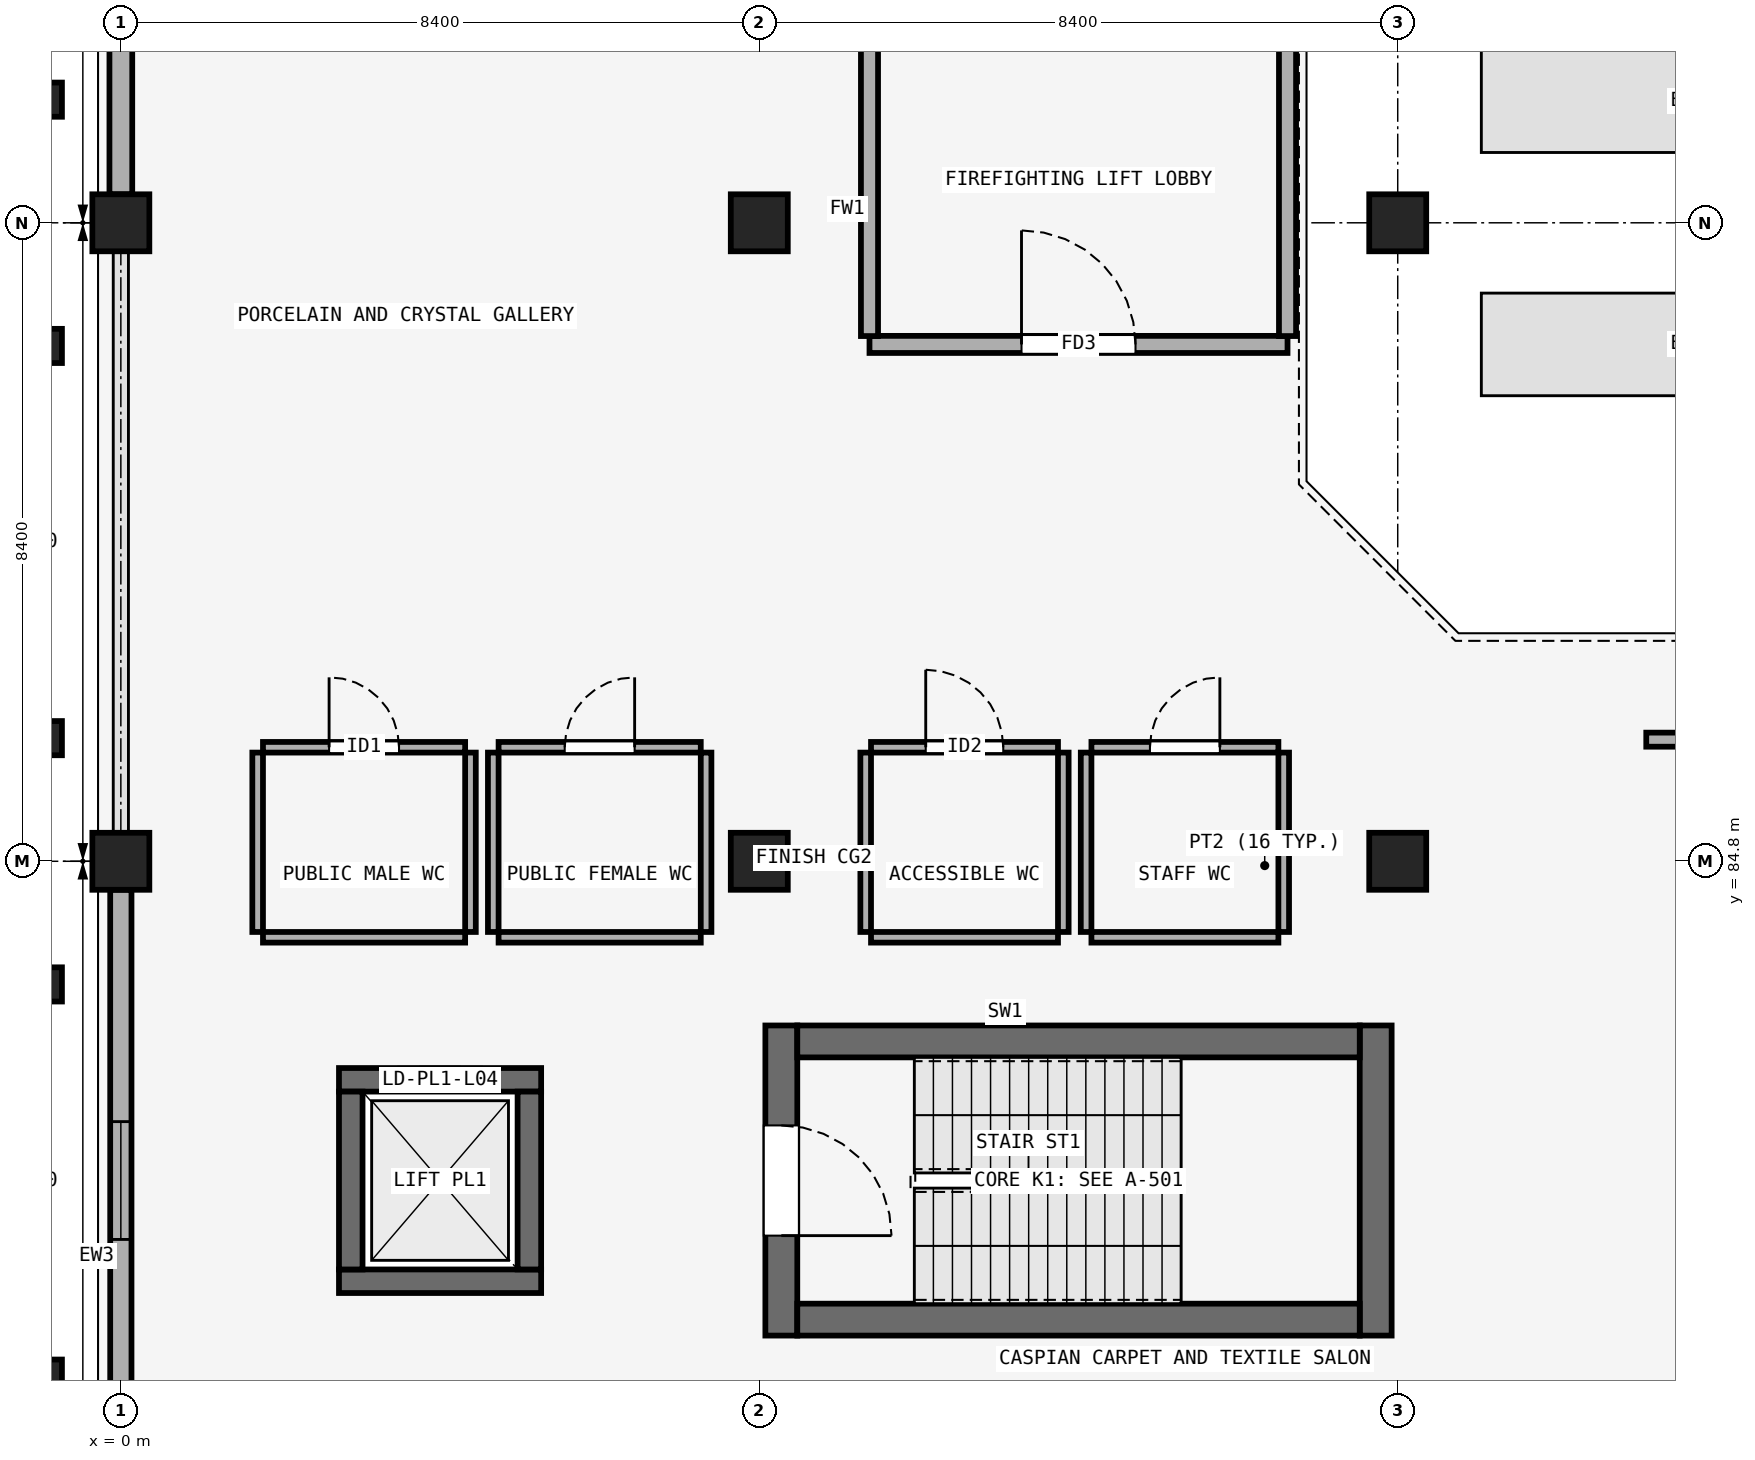
"""IFC4 building model, lengths in metres.
Left out: names, types, materials, properties, quantities, classifications, styles, units other than length and angle.
Written with IfcOpenShell. Run it as: python <this file> out.ifc"""

import sys

from ifc_helpers import new_model, si_unit, direction, frame, frame_2d, origin, origin_2d, place, context, subcontext, project, spatial, rectangle, extrude, element, fill, save


model = new_model("IFC4")
c1 = context("Model", 3, precision=1e-05, world=origin(), true_north=direction((0.0, 1.0)))
c2 = subcontext(c1, "Body", "Model", "MODEL_VIEW")
j1 = project(units=[si_unit("LENGTHUNIT", "METRE"), si_unit("PLANEANGLEUNIT", "RADIAN")], contexts=[c1])
p1 = place(None, origin())
s1 = spatial("IfcSite", under=j1, at=p1, CompositionType="ELEMENT")
p2 = place(p1, origin())
s2 = spatial("IfcBuilding", under=s1, at=p2, CompositionType="ELEMENT")
p3 = place(p2, frame((0.0, 0.0, 18.9)))
s3 = spatial("IfcBuildingStorey", under=s2, at=p3, CompositionType="ELEMENT", Elevation=18.9)
for number, where, z_axis, x_axis in (
    (1, (0.0, 84.8, 0.0), (0.0, 0.0, 1.0), (1.0, 0.0, 0.0)),
    (2, (8.4, 84.8, 0.0), (0.0, 0.0, 1.0), (1.0, 0.0, 0.0)),
    (3, (16.8, 84.8, 0.0), (0.0, 0.0, 1.0), (1.0, 0.0, 0.0)),
    (4, (0.0, 93.2, 0.0), (0.0, 0.0, 1.0), (1.0, 0.0, 0.0)),
    (5, (8.4, 93.2, 0.0), (0.0, 0.0, 1.0), (1.0, 0.0, 0.0)),
    (6, (16.8, 93.2, 0.0), (0.0, 0.0, 1.0), (1.0, 0.0, 0.0)),
):
    element("IfcColumn", number, at=place(p3, frame(where, z_axis=z_axis, x_axis=x_axis)), inside=s3, PredefinedType="COLUMN", context=c2, shape_type="SweptSolid", body=[
        extrude(rectangle(XDim=0.75, YDim=0.75, at=origin_2d()), origin(), (0.0, 0.0, 1.0), 4.5),
    ])
for number, where, z_axis, x_axis in (
    (7, (-1.05, 78.02, 0.0), (0.0, 0.0, 1.0), (0.0, 1.0, 0.0)),
    (8, (-1.05, 83.18, 0.0), (0.0, 0.0, 1.0), (0.0, 1.0, 0.0)),
    (9, (-1.05, 86.42, 0.0), (0.0, 0.0, 1.0), (0.0, 1.0, 0.0)),
    (10, (-1.05, 91.58, 0.0), (0.0, 0.0, 1.0), (0.0, 1.0, 0.0)),
    (11, (-1.05, 94.82, 0.0), (0.0, 0.0, 1.0), (0.0, 1.0, 0.0)),
):
    element("IfcColumn", number, at=place(p3, frame(where, z_axis=z_axis, x_axis=x_axis)), inside=s3, PredefinedType="PILASTER", context=c2, shape_type="SweptSolid", body=[
        extrude(rectangle(XDim=0.45, YDim=0.55, at=origin_2d()), origin(), (0.0, 0.0, 1.0), 4.5),
    ])
p4 = place(p3, frame((0.0, 76.775, 0.0), z_axis=(0.0, 0.0, 1.0), x_axis=(0.0, 1.0, 0.0)))
e12 = element("IfcWall", 12, at=p4, inside=s3, PredefinedType="SOLIDWALL", context=c2, shape_type="SweptSolid", body=[
    extrude(rectangle(XDim=7.65, YDim=0.28, at=frame_2d((3.825, 0.0))), origin(), (0.0, 0.0, 1.0), 3.45),
])
p5 = place(p4, frame((3.05, 0.0, 0.95)))
e13 = element("IfcOpeningElement", 13, at=p5, cuts=e12, PredefinedType="OPENING", context=c2, shape_type="SweptSolid", body=[
    extrude(rectangle(XDim=1.55, YDim=1.6, at=frame_2d((0.775, 0.8))), frame((0.0, 0.15, 0.0), z_axis=(0.0, -1.0, 0.0), x_axis=(1.0, 0.0, 0.0)), (0.0, 0.0, 1.0), 0.3),
])
p6 = place(p3, frame((0.0, 93.575, 0.0), z_axis=(0.0, 0.0, 1.0), x_axis=(0.0, 1.0, 0.0)))
e14 = element("IfcWall", 14, at=p6, inside=s3, PredefinedType="SOLIDWALL", context=c2, shape_type="SweptSolid", body=[
    extrude(rectangle(XDim=7.65, YDim=0.3, at=frame_2d((3.825, 0.0))), origin(), (0.0, 0.0, 1.0), 3.45),
])
p7 = place(p6, frame((3.05, 0.0, 0.95)))
e15 = element("IfcOpeningElement", 15, at=p7, cuts=e14, PredefinedType="OPENING", context=c2, shape_type="SweptSolid", body=[
    extrude(rectangle(XDim=1.55, YDim=1.85, at=frame_2d((0.775, 0.925))), frame((0.0, 0.16, 0.0), z_axis=(0.0, -1.0, 0.0), x_axis=(1.0, 0.0, 0.0)), (0.0, 0.0, 1.0), 0.32),
])
p8 = place(p3, frame((8.69, 82.64, 0.0), z_axis=(0.0, 0.0, 1.0), x_axis=(0.0, -1.0, 0.0)))
e16 = element("IfcWall", 16, at=p8, inside=s3, PredefinedType="SHEAR", context=c2, shape_type="SweptSolid", body=[
    extrude(rectangle(XDim=4.08, YDim=0.42, at=frame_2d((2.04, 0.0))), origin(), (0.0, 0.0, 1.0), 4.2),
])
p9 = place(p8, frame((1.315, 0.0, 0.0)))
e17 = element("IfcOpeningElement", 17, at=p9, cuts=e16, PredefinedType="OPENING", context=c2, shape_type="SweptSolid", body=[
    extrude(rectangle(XDim=1.45, YDim=2.2, at=frame_2d((0.725, 1.1))), frame((0.0, 0.22, 0.0), z_axis=(0.0, -1.0, 0.0), x_axis=(1.0, 0.0, 0.0)), (0.0, 0.0, 1.0), 0.44),
])
p10 = place(p3, frame((16.51, 78.56, 0.0), z_axis=(0.0, 0.0, 1.0), x_axis=(0.0, 1.0, 0.0)))
e18 = element("IfcWall", 18, at=p10, inside=s3, PredefinedType="SHEAR", context=c2, shape_type="SweptSolid", body=[
    extrude(rectangle(XDim=4.08, YDim=0.42, at=frame_2d((2.04, 0.0))), origin(), (0.0, 0.0, 1.0), 4.2),
])
for number, where, z_axis, x_axis in (
    (19, (8.9, 78.77, 0.0), (0.0, 0.0, 1.0), (1.0, 0.0, 0.0)),
    (20, (8.9, 82.43, 0.0), (0.0, 0.0, 1.0), (1.0, 0.0, 0.0)),
):
    element("IfcWall", number, at=place(p3, frame(where, z_axis=z_axis, x_axis=x_axis)), inside=s3, PredefinedType="SHEAR", context=c2, shape_type="SweptSolid", body=[
        extrude(rectangle(XDim=7.4, YDim=0.42, at=frame_2d((3.7, 0.0))), origin(), (0.0, 0.0, 1.0), 4.2),
    ])
p11 = place(p3, frame((2.87, 79.275, 0.0), z_axis=(0.0, 0.0, 1.0), x_axis=(1.0, 0.0, 0.0)))
e21 = element("IfcWall", 21, at=p11, inside=s3, PredefinedType="SHEAR", context=c2, shape_type="SweptSolid", body=[
    extrude(rectangle(XDim=2.66, YDim=0.31, at=frame_2d((1.33, 0.0))), origin(), (0.0, 0.0, 1.0), 4.2),
])
p12 = place(p3, frame((2.87, 81.925, 0.0), z_axis=(0.0, 0.0, 1.0), x_axis=(1.0, 0.0, 0.0)))
e22 = element("IfcWall", 22, at=p12, inside=s3, PredefinedType="SHEAR", context=c2, shape_type="SweptSolid", body=[
    extrude(rectangle(XDim=2.66, YDim=0.31, at=frame_2d((1.33, 0.0))), origin(), (0.0, 0.0, 1.0), 4.2),
])
p13 = place(p12, frame((0.78, 0.0, 0.0)))
e23 = element("IfcOpeningElement", 23, at=p13, cuts=e22, PredefinedType="OPENING", context=c2, shape_type="SweptSolid", body=[
    extrude(rectangle(XDim=1.1, YDim=2.2, at=frame_2d((0.55, 1.1))), frame((0.0, 0.165, 0.0), z_axis=(0.0, -1.0, 0.0), x_axis=(1.0, 0.0, 0.0)), (0.0, 0.0, 1.0), 0.33),
])
for number, where, z_axis, x_axis in (
    (24, (3.025, 79.43, 0.0), (0.0, 0.0, 1.0), (0.0, 1.0, 0.0)),
    (25, (5.375, 79.43, 0.0), (0.0, 0.0, 1.0), (0.0, 1.0, 0.0)),
):
    element("IfcWall", number, at=place(p3, frame(where, z_axis=z_axis, x_axis=x_axis)), inside=s3, PredefinedType="SHEAR", context=c2, shape_type="SweptSolid", body=[
        extrude(rectangle(XDim=2.34, YDim=0.31, at=frame_2d((1.17, 0.0))), origin(), (0.0, 0.0, 1.0), 4.2),
    ])
p14 = place(p3, frame((9.85, 91.6, 0.0), z_axis=(0.0, 0.0, 1.0), x_axis=(1.0, 0.0, 0.0)))
e26 = element("IfcWall", 26, at=p14, inside=s3, PredefinedType="PARTITIONING", context=c2, shape_type="SweptSolid", body=[
    extrude(rectangle(XDim=5.5, YDim=0.225, at=frame_2d((2.75, 0.0))), origin(), (0.0, 0.0, 1.0), 4.2),
])
p15 = place(p14, frame((2.0, 0.0, 0.0)))
e27 = element("IfcOpeningElement", 27, at=p15, cuts=e26, PredefinedType="OPENING", context=c2, shape_type="SweptSolid", body=[
    extrude(rectangle(XDim=1.5, YDim=2.25, at=frame_2d((0.75, 1.125))), frame((0.0, 0.123, 0.0), z_axis=(0.0, -1.0, 0.0), x_axis=(1.0, 0.0, 0.0)), (0.0, 0.0, 1.0), 0.245),
])
for number, where, z_axis, x_axis in (
    (28, (9.85, 91.71, 0.0), (0.0, 0.0, 1.0), (0.0, 1.0, 0.0)),
    (29, (15.35, 91.71, 0.0), (0.0, 0.0, 1.0), (0.0, 1.0, 0.0)),
):
    element("IfcWall", number, at=place(p3, frame(where, z_axis=z_axis, x_axis=x_axis)), inside=s3, PredefinedType="PARTITIONING", context=c2, shape_type="SweptSolid", body=[
        extrude(rectangle(XDim=4.53, YDim=0.225, at=frame_2d((2.265, 0.0))), origin(), (0.0, 0.0, 1.0), 3.5),
    ])
p16 = place(p3, frame((1.87, 86.3, 0.0), z_axis=(0.0, 0.0, 1.0), x_axis=(1.0, 0.0, 0.0)))
e30 = element("IfcWall", 30, at=p16, inside=s3, PredefinedType="PARTITIONING", context=c2, shape_type="SweptSolid", body=[
    extrude(rectangle(XDim=2.66, YDim=0.14, at=frame_2d((1.33, 0.0))), origin(), (0.0, 0.0, 1.0), 4.2),
])
p17 = place(p16, frame((0.87, 0.0, 0.0)))
e31 = element("IfcOpeningElement", 31, at=p17, cuts=e30, PredefinedType="OPENING", context=c2, shape_type="SweptSolid", body=[
    extrude(rectangle(XDim=0.92, YDim=2.12, at=frame_2d((0.46, 1.06))), frame((0.0, 0.08, 0.0), z_axis=(0.0, -1.0, 0.0), x_axis=(1.0, 0.0, 0.0)), (0.0, 0.0, 1.0), 0.16),
])
p18 = place(p3, frame((1.87, 83.8, 0.0), z_axis=(0.0, 0.0, 1.0), x_axis=(1.0, 0.0, 0.0)))
e32 = element("IfcWall", 32, at=p18, inside=s3, PredefinedType="PARTITIONING", context=c2, shape_type="SweptSolid", body=[
    extrude(rectangle(XDim=2.66, YDim=0.14, at=frame_2d((1.33, 0.0))), origin(), (0.0, 0.0, 1.0), 4.2),
])
for number, where, z_axis, x_axis in (
    (33, (1.8, 83.87, 0.0), (0.0, 0.0, 1.0), (0.0, 1.0, 0.0)),
    (34, (4.6, 83.87, 0.0), (0.0, 0.0, 1.0), (0.0, 1.0, 0.0)),
):
    element("IfcWall", number, at=place(p3, frame(where, z_axis=z_axis, x_axis=x_axis)), inside=s3, PredefinedType="PARTITIONING", context=c2, shape_type="SweptSolid", body=[
        extrude(rectangle(XDim=2.36, YDim=0.14, at=frame_2d((1.18, 0.0))), origin(), (0.0, 0.0, 1.0), 3.45),
    ])
p19 = place(p3, frame((4.97, 86.3, 0.0), z_axis=(0.0, 0.0, 1.0), x_axis=(1.0, 0.0, 0.0)))
e35 = element("IfcWall", 35, at=p19, inside=s3, PredefinedType="PARTITIONING", context=c2, shape_type="SweptSolid", body=[
    extrude(rectangle(XDim=2.66, YDim=0.14, at=frame_2d((1.33, 0.0))), origin(), (0.0, 0.0, 1.0), 4.2),
])
p20 = place(p19, frame((0.87, 0.0, 0.0)))
e36 = element("IfcOpeningElement", 36, at=p20, cuts=e35, PredefinedType="OPENING", context=c2, shape_type="SweptSolid", body=[
    extrude(rectangle(XDim=0.92, YDim=2.12, at=frame_2d((0.46, 1.06))), frame((0.0, 0.08, 0.0), z_axis=(0.0, -1.0, 0.0), x_axis=(1.0, 0.0, 0.0)), (0.0, 0.0, 1.0), 0.16),
])
p21 = place(p3, frame((4.97, 83.8, 0.0), z_axis=(0.0, 0.0, 1.0), x_axis=(1.0, 0.0, 0.0)))
e37 = element("IfcWall", 37, at=p21, inside=s3, PredefinedType="PARTITIONING", context=c2, shape_type="SweptSolid", body=[
    extrude(rectangle(XDim=2.66, YDim=0.14, at=frame_2d((1.33, 0.0))), origin(), (0.0, 0.0, 1.0), 4.2),
])
for number, where, z_axis, x_axis in (
    (38, (4.9, 83.87, 0.0), (0.0, 0.0, 1.0), (0.0, 1.0, 0.0)),
    (39, (7.7, 83.87, 0.0), (0.0, 0.0, 1.0), (0.0, 1.0, 0.0)),
):
    element("IfcWall", number, at=place(p3, frame(where, z_axis=z_axis, x_axis=x_axis)), inside=s3, PredefinedType="PARTITIONING", context=c2, shape_type="SweptSolid", body=[
        extrude(rectangle(XDim=2.36, YDim=0.14, at=frame_2d((1.18, 0.0))), origin(), (0.0, 0.0, 1.0), 3.45),
    ])
p22 = place(p3, frame((9.87, 86.3, 0.0), z_axis=(0.0, 0.0, 1.0), x_axis=(1.0, 0.0, 0.0)))
e40 = element("IfcWall", 40, at=p22, inside=s3, PredefinedType="PARTITIONING", context=c2, shape_type="SweptSolid", body=[
    extrude(rectangle(XDim=2.46, YDim=0.14, at=frame_2d((1.23, 0.0))), origin(), (0.0, 0.0, 1.0), 4.2),
])
p23 = place(p22, frame((0.72, 0.0, 0.0)))
e41 = element("IfcOpeningElement", 41, at=p23, cuts=e40, PredefinedType="OPENING", context=c2, shape_type="SweptSolid", body=[
    extrude(rectangle(XDim=1.02, YDim=2.15, at=frame_2d((0.51, 1.075))), frame((0.0, 0.08, 0.0), z_axis=(0.0, -1.0, 0.0), x_axis=(1.0, 0.0, 0.0)), (0.0, 0.0, 1.0), 0.16),
])
p24 = place(p3, frame((9.87, 83.8, 0.0), z_axis=(0.0, 0.0, 1.0), x_axis=(1.0, 0.0, 0.0)))
e42 = element("IfcWall", 42, at=p24, inside=s3, PredefinedType="PARTITIONING", context=c2, shape_type="SweptSolid", body=[
    extrude(rectangle(XDim=2.46, YDim=0.14, at=frame_2d((1.23, 0.0))), origin(), (0.0, 0.0, 1.0), 4.2),
])
for number, where, z_axis, x_axis in (
    (43, (9.8, 83.87, 0.0), (0.0, 0.0, 1.0), (0.0, 1.0, 0.0)),
    (44, (12.4, 83.87, 0.0), (0.0, 0.0, 1.0), (0.0, 1.0, 0.0)),
):
    element("IfcWall", number, at=place(p3, frame(where, z_axis=z_axis, x_axis=x_axis)), inside=s3, PredefinedType="PARTITIONING", context=c2, shape_type="SweptSolid", body=[
        extrude(rectangle(XDim=2.36, YDim=0.14, at=frame_2d((1.18, 0.0))), origin(), (0.0, 0.0, 1.0), 3.45),
    ])
p25 = place(p3, frame((12.77, 86.3, 0.0), z_axis=(0.0, 0.0, 1.0), x_axis=(1.0, 0.0, 0.0)))
e45 = element("IfcWall", 45, at=p25, inside=s3, PredefinedType="PARTITIONING", context=c2, shape_type="SweptSolid", body=[
    extrude(rectangle(XDim=2.46, YDim=0.14, at=frame_2d((1.23, 0.0))), origin(), (0.0, 0.0, 1.0), 4.2),
])
p26 = place(p25, frame((0.77, 0.0, 0.0)))
e46 = element("IfcOpeningElement", 46, at=p26, cuts=e45, PredefinedType="OPENING", context=c2, shape_type="SweptSolid", body=[
    extrude(rectangle(XDim=0.92, YDim=2.12, at=frame_2d((0.46, 1.06))), frame((0.0, 0.08, 0.0), z_axis=(0.0, -1.0, 0.0), x_axis=(1.0, 0.0, 0.0)), (0.0, 0.0, 1.0), 0.16),
])
p27 = place(p3, frame((12.77, 83.8, 0.0), z_axis=(0.0, 0.0, 1.0), x_axis=(1.0, 0.0, 0.0)))
e47 = element("IfcWall", 47, at=p27, inside=s3, PredefinedType="PARTITIONING", context=c2, shape_type="SweptSolid", body=[
    extrude(rectangle(XDim=2.46, YDim=0.14, at=frame_2d((1.23, 0.0))), origin(), (0.0, 0.0, 1.0), 4.2),
])
for number, where, z_axis, x_axis in (
    (48, (12.7, 83.87, 0.0), (0.0, 0.0, 1.0), (0.0, 1.0, 0.0)),
    (49, (15.3, 83.87, 0.0), (0.0, 0.0, 1.0), (0.0, 1.0, 0.0)),
):
    element("IfcWall", number, at=place(p3, frame(where, z_axis=z_axis, x_axis=x_axis)), inside=s3, PredefinedType="PARTITIONING", context=c2, shape_type="SweptSolid", body=[
        extrude(rectangle(XDim=2.36, YDim=0.14, at=frame_2d((1.18, 0.0))), origin(), (0.0, 0.0, 1.0), 3.45),
    ])
p28 = place(p3, frame((20.07, 86.4, 0.0), z_axis=(0.0, 0.0, 1.0), x_axis=(1.0, 0.0, 0.0)))
e50 = element("IfcWall", 50, at=p28, inside=s3, PredefinedType="PARTITIONING", context=c2, shape_type="SweptSolid", body=[
    extrude(rectangle(XDim=6.91, YDim=0.185, at=frame_2d((3.455, 0.0))), origin(), (0.0, 0.0, 1.0), 4.2),
])
p29 = place(p5, origin())
e51 = element("IfcWindow", 51, at=p29, inside=s3, PartitioningType="SINGLE_PANEL", PredefinedType="WINDOW", context=c2, shape_type="SweptSolid", body=[
    extrude(rectangle(XDim=1.55, YDim=1.6, at=frame_2d((0.775, 0.8))), frame((0.0, 0.03, 0.0), z_axis=(0.0, -1.0, 0.0), x_axis=(1.0, 0.0, 0.0)), (0.0, 0.0, 1.0), 0.06),
])
fill(e13, e51)
p30 = place(p9, origin())
e52 = element("IfcDoor", 52, at=p30, inside=s3, OperationType="SINGLE_SWING_RIGHT", PredefinedType="DOOR", context=c2, shape_type="SweptSolid", body=[
    extrude(rectangle(XDim=1.45, YDim=2.2, at=frame_2d((0.725, 1.1))), frame((0.0, 0.025, 0.0), z_axis=(0.0, -1.0, 0.0), x_axis=(1.0, 0.0, 0.0)), (0.0, 0.0, 1.0), 0.05),
])
fill(e17, e52)
p31 = place(p13, origin())
e53 = element("IfcDoor", 53, at=p31, inside=s3, OperationType="SLIDING_TO_LEFT", PredefinedType="DOOR", context=c2, shape_type="SweptSolid", body=[
    extrude(rectangle(XDim=1.1, YDim=2.2, at=frame_2d((0.55, 1.1))), frame((0.0, 0.025, 0.0), z_axis=(0.0, -1.0, 0.0), x_axis=(1.0, 0.0, 0.0)), (0.0, 0.0, 1.0), 0.05),
])
fill(e23, e53)
p32 = place(p15, origin())
e54 = element("IfcDoor", 54, at=p32, inside=s3, OperationType="SINGLE_SWING_LEFT", PredefinedType="DOOR", context=c2, shape_type="SweptSolid", body=[
    extrude(rectangle(XDim=1.5, YDim=2.25, at=frame_2d((0.75, 1.125))), frame((0.0, 0.025, 0.0), z_axis=(0.0, -1.0, 0.0), x_axis=(1.0, 0.0, 0.0)), (0.0, 0.0, 1.0), 0.05),
])
fill(e27, e54)
p33 = place(p17, origin())
e55 = element("IfcDoor", 55, at=p33, inside=s3, OperationType="SINGLE_SWING_LEFT", PredefinedType="DOOR", context=c2, shape_type="SweptSolid", body=[
    extrude(rectangle(XDim=0.92, YDim=2.12, at=frame_2d((0.46, 1.06))), frame((0.0, 0.025, 0.0), z_axis=(0.0, -1.0, 0.0), x_axis=(1.0, 0.0, 0.0)), (0.0, 0.0, 1.0), 0.05),
])
fill(e31, e55)
p34 = place(p20, origin())
e56 = element("IfcDoor", 56, at=p34, inside=s3, OperationType="SINGLE_SWING_RIGHT", PredefinedType="DOOR", context=c2, shape_type="SweptSolid", body=[
    extrude(rectangle(XDim=0.92, YDim=2.12, at=frame_2d((0.46, 1.06))), frame((0.0, 0.025, 0.0), z_axis=(0.0, -1.0, 0.0), x_axis=(1.0, 0.0, 0.0)), (0.0, 0.0, 1.0), 0.05),
])
fill(e36, e56)
p35 = place(p23, origin())
e57 = element("IfcDoor", 57, at=p35, inside=s3, OperationType="SINGLE_SWING_LEFT", PredefinedType="DOOR", context=c2, shape_type="SweptSolid", body=[
    extrude(rectangle(XDim=1.02, YDim=2.15, at=frame_2d((0.51, 1.075))), frame((0.0, 0.025, 0.0), z_axis=(0.0, -1.0, 0.0), x_axis=(1.0, 0.0, 0.0)), (0.0, 0.0, 1.0), 0.05),
])
fill(e41, e57)
p36 = place(p26, origin())
e58 = element("IfcDoor", 58, at=p36, inside=s3, OperationType="SINGLE_SWING_RIGHT", PredefinedType="DOOR", context=c2, shape_type="SweptSolid", body=[
    extrude(rectangle(XDim=0.92, YDim=2.12, at=frame_2d((0.46, 1.06))), frame((0.0, 0.025, 0.0), z_axis=(0.0, -1.0, 0.0), x_axis=(1.0, 0.0, 0.0)), (0.0, 0.0, 1.0), 0.05),
])
fill(e46, e58)
save(model, sys.argv[1])
